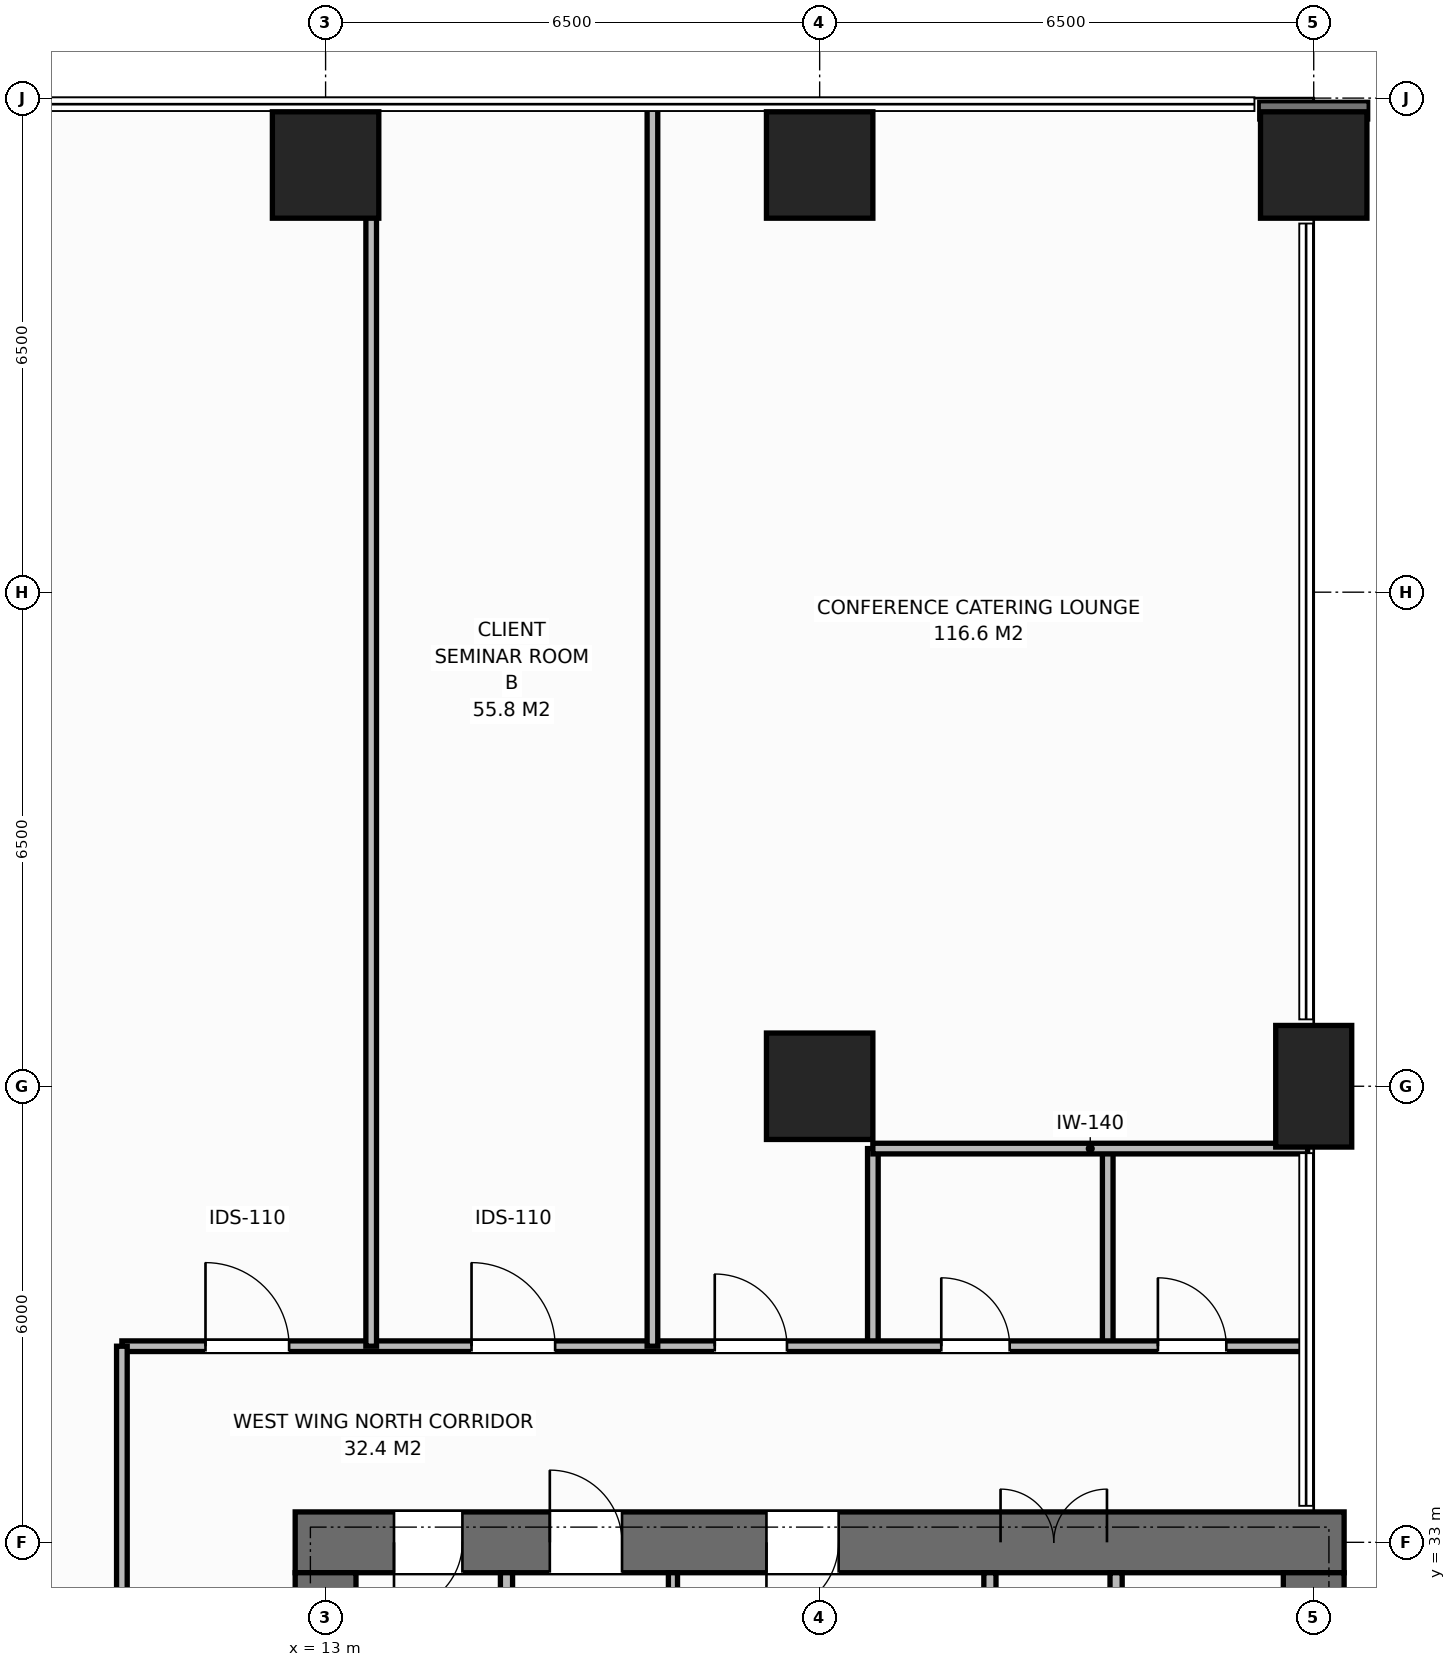
"""IFC4 building model, lengths in metres.
Left out: names, types, materials, properties, quantities, classifications, styles, units other than length and angle.
Written with IfcOpenShell. Run it as: python <this file> out.ifc"""

import sys

from ifc_helpers import new_model, si_unit, direction, frame, frame_2d, origin, origin_2d, place, context, subcontext, project, spatial, rectangle, extrude, element, fill, save


model = new_model("IFC4")
c1 = context("Model", 3, precision=1e-05, world=origin(), true_north=direction((0.0, 1.0)))
c2 = subcontext(c1, "Body", "Model", "MODEL_VIEW")
j1 = project(units=[si_unit("LENGTHUNIT", "METRE"), si_unit("PLANEANGLEUNIT", "RADIAN")], contexts=[c1])
p1 = place(None, origin())
s1 = spatial("IfcSite", under=j1, at=p1, CompositionType="ELEMENT")
p2 = place(p1, origin())
s2 = spatial("IfcBuilding", under=s1, at=p2, CompositionType="ELEMENT")
p3 = place(p2, frame((0.0, 0.0, 6.0)))
s3 = spatial("IfcBuildingStorey", under=s2, at=p3, CompositionType="ELEMENT", Elevation=6.0)
p4 = place(p3, frame((12.6, 33.0, 0.0), z_axis=(0.0, 0.0, 1.0), x_axis=(1.0, 0.0, 0.0)))
e1 = element("IfcWall", 1, at=p4, inside=s3, PredefinedType="SHEAR", context=c2, shape_type="SweptSolid", body=[
    extrude(rectangle(XDim=13.8, YDim=0.8, at=frame_2d((6.9, 0.0))), origin(), (0.0, 0.0, 1.0), 5.5),
])
p5 = place(p4, frame((1.3, 0.0, 0.0)))
e2 = element("IfcOpeningElement", 2, at=p5, cuts=e1, PredefinedType="OPENING", context=c2, shape_type="SweptSolid", body=[
    extrude(rectangle(XDim=0.9, YDim=2.15, at=frame_2d((0.45, 1.075))), frame((0.0, 0.41, 0.0), z_axis=(0.0, -1.0, 0.0), x_axis=(1.0, 0.0, 0.0)), (0.0, 0.0, 1.0), 0.82),
])
p6 = place(p4, frame((3.35, 0.0, 0.0)))
e3 = element("IfcOpeningElement", 3, at=p6, cuts=e1, PredefinedType="OPENING", context=c2, shape_type="SweptSolid", body=[
    extrude(rectangle(XDim=0.95, YDim=2.15, at=frame_2d((0.475, 1.075))), frame((0.0, 0.41, 0.0), z_axis=(0.0, -1.0, 0.0), x_axis=(1.0, 0.0, 0.0)), (0.0, 0.0, 1.0), 0.82),
])
p7 = place(p4, frame((6.2, 0.0, 0.0)))
e4 = element("IfcOpeningElement", 4, at=p7, cuts=e1, PredefinedType="OPENING", context=c2, shape_type="SweptSolid", body=[
    extrude(rectangle(XDim=0.95, YDim=2.15, at=frame_2d((0.475, 1.075))), frame((0.0, 0.41, 0.0), z_axis=(0.0, -1.0, 0.0), x_axis=(1.0, 0.0, 0.0)), (0.0, 0.0, 1.0), 0.82),
])
p8 = place(p4, frame((9.28, 0.0, 0.0)))
e5 = element("IfcOpeningElement", 5, at=p8, cuts=e1, PredefinedType="OPENING", context=c2, shape_type="SweptSolid", body=[
    extrude(rectangle(XDim=1.4, YDim=2.2, at=frame_2d((0.7, 1.1))), frame((0.0, 0.41, 0.0), z_axis=(0.0, -1.0, 0.0), x_axis=(1.0, 0.0, 0.0)), (0.0, 0.0, 1.0), 0.82),
])
p9 = place(p3, frame((13.0, 19.4, 0.0), z_axis=(0.0, 0.0, 1.0), x_axis=(0.0, 1.0, 0.0)))
e6 = element("IfcWall", 6, at=p9, inside=s3, PredefinedType="SHEAR", context=c2, shape_type="SweptSolid", body=[
    extrude(rectangle(XDim=13.2, YDim=0.8, at=frame_2d((6.6, 0.0))), origin(), (0.0, 0.0, 1.0), 5.5),
])
p10 = place(p9, frame((4.65, 0.0, 0.0)))
e7 = element("IfcOpeningElement", 7, at=p10, cuts=e6, PredefinedType="OPENING", context=c2, shape_type="SweptSolid", body=[
    extrude(rectangle(XDim=1.4, YDim=2.2, at=frame_2d((0.7, 1.1))), frame((0.0, 0.41, 0.0), z_axis=(0.0, -1.0, 0.0), x_axis=(1.0, 0.0, 0.0)), (0.0, 0.0, 1.0), 0.82),
])
p11 = place(p3, frame((26.0, 19.4, 0.0), z_axis=(0.0, 0.0, 1.0), x_axis=(0.0, 1.0, 0.0)))
e8 = element("IfcWall", 8, at=p11, inside=s3, PredefinedType="SHEAR", context=c2, shape_type="SweptSolid", body=[
    extrude(rectangle(XDim=13.2, YDim=0.8, at=frame_2d((6.6, 0.0))), origin(), (0.0, 0.0, 1.0), 5.5),
])
p12 = place(p3, frame((19.5, 39.0, 0.0), z_axis=(0.0, 0.0, 1.0), x_axis=(1.0, 0.0, 0.0)))
e9 = element("IfcColumn", 9, at=p12, inside=s3, PredefinedType="COLUMN", context=c2, shape_type="SweptSolid", body=[
    extrude(rectangle(XDim=1.4, YDim=1.4, at=origin_2d()), origin(), (0.0, 0.0, 1.0), 5.5),
])
p13 = place(p3, frame((26.0, 39.0, 0.0), z_axis=(0.0, 0.0, 1.0), x_axis=(1.0, 0.0, 0.0)))
e10 = element("IfcColumn", 10, at=p13, inside=s3, PredefinedType="PILASTER", context=c2, shape_type="SweptSolid", body=[
    extrude(rectangle(XDim=1.0, YDim=1.6, at=origin_2d()), origin(), (0.0, 0.0, 1.0), 5.5),
])
for number, where, z_axis, x_axis in (
    (11, (13.0, 51.12, 0.0), (0.0, 0.0, 1.0), (1.0, 0.0, 0.0)),
    (12, (19.5, 51.12, 0.0), (0.0, 0.0, 1.0), (1.0, 0.0, 0.0)),
    (13, (26.0, 51.12, 0.0), (0.0, 0.0, 1.0), (1.0, 0.0, 0.0)),
):
    element("IfcColumn", number, at=place(p3, frame(where, z_axis=z_axis, x_axis=x_axis)), inside=s3, PredefinedType="COLUMN", context=c2, shape_type="SweptSolid", body=[
        extrude(rectangle(XDim=1.4, YDim=1.4, at=origin_2d()), origin(), (0.0, 0.0, 1.0), 5.5),
    ])
p14 = place(p3, frame((15.38, 26.56, 0.0), z_axis=(0.0, 0.0, 1.0), x_axis=(0.0, 1.0, 0.0)))
e14 = element("IfcWall", 14, at=p14, inside=s3, PredefinedType="STANDARD", context=c2, shape_type="SweptSolid", body=[
    extrude(rectangle(XDim=6.04, YDim=0.16, at=frame_2d((3.02, 0.0))), origin(), (0.0, 0.0, 1.0), 5.22),
])
p15 = place(p3, frame((17.57, 26.56, 0.0), z_axis=(0.0, 0.0, 1.0), x_axis=(0.0, 1.0, 0.0)))
e15 = element("IfcWall", 15, at=p15, inside=s3, PredefinedType="PARTITIONING", context=c2, shape_type="SweptSolid", body=[
    extrude(rectangle(XDim=6.04, YDim=0.12, at=frame_2d((3.02, 0.0))), origin(), (0.0, 0.0, 1.0), 5.22),
])
p16 = place(p3, frame((21.74, 26.56, 0.0), z_axis=(0.0, 0.0, 1.0), x_axis=(0.0, 1.0, 0.0)))
e16 = element("IfcWall", 16, at=p16, inside=s3, PredefinedType="STANDARD", context=c2, shape_type="SweptSolid", body=[
    extrude(rectangle(XDim=6.04, YDim=0.16, at=frame_2d((3.02, 0.0))), origin(), (0.0, 0.0, 1.0), 5.22),
])
p17 = place(p3, frame((23.4, 19.4, 0.0), z_axis=(0.0, 0.0, 1.0), x_axis=(0.0, 1.0, 0.0)))
e17 = element("IfcWall", 17, at=p17, inside=s3, PredefinedType="STANDARD", context=c2, shape_type="SweptSolid", body=[
    extrude(rectangle(XDim=13.2, YDim=0.16, at=frame_2d((6.6, 0.0))), origin(), (0.0, 0.0, 1.0), 5.22),
])
p18 = place(p17, frame((0.55, 0.0, 0.0)))
e18 = element("IfcOpeningElement", 18, at=p18, cuts=e17, PredefinedType="OPENING", context=c2, shape_type="SweptSolid", body=[
    extrude(rectangle(XDim=1.1, YDim=2.2, at=frame_2d((0.55, 1.1))), frame((0.0, 0.09, 0.0), z_axis=(0.0, -1.0, 0.0), x_axis=(1.0, 0.0, 0.0)), (0.0, 0.0, 1.0), 0.18),
])
p19 = place(p17, frame((2.7, 0.0, 0.0)))
e19 = element("IfcOpeningElement", 19, at=p19, cuts=e17, PredefinedType="OPENING", context=c2, shape_type="SweptSolid", body=[
    extrude(rectangle(XDim=1.1, YDim=2.2, at=frame_2d((0.55, 1.1))), frame((0.0, 0.09, 0.0), z_axis=(0.0, -1.0, 0.0), x_axis=(1.0, 0.0, 0.0)), (0.0, 0.0, 1.0), 0.18),
])
for number, where, z_axis, x_axis in (
    (20, (20.2, 35.58, 0.0), (0.0, 0.0, 1.0), (0.0, 1.0, 0.0)),
    (21, (23.29, 35.58, 0.0), (0.0, 0.0, 1.0), (0.0, 1.0, 0.0)),
):
    element("IfcWall", number, at=place(p3, frame(where, z_axis=z_axis, x_axis=x_axis)), inside=s3, PredefinedType="PARTITIONING", context=c2, shape_type="SweptSolid", body=[
        extrude(rectangle(XDim=2.6, YDim=0.14, at=frame_2d((1.3, 0.0))), origin(), (0.0, 0.0, 1.0), 5.22),
    ])
p20 = place(p3, frame((20.2, 38.18, 0.0), z_axis=(0.0, 0.0, 1.0), x_axis=(1.0, 0.0, 0.0)))
e22 = element("IfcWall", 22, at=p20, inside=s3, PredefinedType="PARTITIONING", context=c2, shape_type="SweptSolid", body=[
    extrude(rectangle(XDim=5.72, YDim=0.14, at=frame_2d((2.86, 0.0))), origin(), (0.0, 0.0, 1.0), 5.22),
])
p21 = place(p3, frame((10.32, 35.58, 0.0), z_axis=(0.0, 0.0, 1.0), x_axis=(1.0, 0.0, 0.0)))
e23 = element("IfcWall", 23, at=p21, inside=s3, PredefinedType="PARTITIONING", context=c2, shape_type="SweptSolid", body=[
    extrude(rectangle(XDim=15.6, YDim=0.14, at=frame_2d((7.8, 0.0))), origin(), (0.0, 0.0, 1.0), 5.22),
])
p22 = place(p21, frame((10.78, 0.0, 0.0)))
e24 = element("IfcOpeningElement", 24, at=p22, cuts=e23, PredefinedType="OPENING", context=c2, shape_type="SweptSolid", body=[
    extrude(rectangle(XDim=0.9, YDim=2.15, at=frame_2d((0.45, 1.075))), frame((0.0, 0.08, 0.0), z_axis=(0.0, -1.0, 0.0), x_axis=(1.0, 0.0, 0.0)), (0.0, 0.0, 1.0), 0.16),
])
p23 = place(p21, frame((13.63, 0.0, 0.0)))
e25 = element("IfcOpeningElement", 25, at=p23, cuts=e23, PredefinedType="OPENING", context=c2, shape_type="SweptSolid", body=[
    extrude(rectangle(XDim=0.9, YDim=2.15, at=frame_2d((0.45, 1.075))), frame((0.0, 0.08, 0.0), z_axis=(0.0, -1.0, 0.0), x_axis=(1.0, 0.0, 0.0)), (0.0, 0.0, 1.0), 0.16),
])
p24 = place(p21, frame((1.1, 0.0, 0.0)))
e26 = element("IfcOpeningElement", 26, at=p24, cuts=e23, PredefinedType="OPENING", context=c2, shape_type="SweptSolid", body=[
    extrude(rectangle(XDim=1.1, YDim=2.15, at=frame_2d((0.55, 1.075))), frame((0.0, 0.08, 0.0), z_axis=(0.0, -1.0, 0.0), x_axis=(1.0, 0.0, 0.0)), (0.0, 0.0, 1.0), 0.16),
])
p25 = place(p21, frame((4.6, 0.0, 0.0)))
e27 = element("IfcOpeningElement", 27, at=p25, cuts=e23, PredefinedType="OPENING", context=c2, shape_type="SweptSolid", body=[
    extrude(rectangle(XDim=1.1, YDim=2.15, at=frame_2d((0.55, 1.075))), frame((0.0, 0.08, 0.0), z_axis=(0.0, -1.0, 0.0), x_axis=(1.0, 0.0, 0.0)), (0.0, 0.0, 1.0), 0.16),
])
p26 = place(p21, frame((7.8, 0.0, 0.0)))
e28 = element("IfcOpeningElement", 28, at=p26, cuts=e23, PredefinedType="OPENING", context=c2, shape_type="SweptSolid", body=[
    extrude(rectangle(XDim=0.95, YDim=2.15, at=frame_2d((0.475, 1.075))), frame((0.0, 0.08, 0.0), z_axis=(0.0, -1.0, 0.0), x_axis=(1.0, 0.0, 0.0)), (0.0, 0.0, 1.0), 0.16),
])
for number, where, z_axis, x_axis in (
    (29, (13.6, 35.58, 0.0), (0.0, 0.0, 1.0), (0.0, 1.0, 0.0)),
    (30, (17.3, 35.58, 0.0), (0.0, 0.0, 1.0), (0.0, 1.0, 0.0)),
):
    element("IfcWall", number, at=place(p3, frame(where, z_axis=z_axis, x_axis=x_axis)), inside=s3, PredefinedType="PARTITIONING", context=c2, shape_type="SweptSolid", body=[
        extrude(rectangle(XDim=16.36, YDim=0.14, at=frame_2d((8.18, 0.0))), origin(), (0.0, 0.0, 1.0), 5.22),
    ])
p27 = place(p3, frame((10.32, 18.6, 0.0), z_axis=(0.0, 0.0, 1.0), x_axis=(0.0, 1.0, 0.0)))
e31 = element("IfcWall", 31, at=p27, inside=s3, PredefinedType="PARTITIONING", context=c2, shape_type="SweptSolid", body=[
    extrude(rectangle(XDim=16.98, YDim=0.14, at=frame_2d((8.49, 0.0))), origin(), (0.0, 0.0, 1.0), 5.22),
])
p28 = place(p27, frame((4.0, 0.0, 0.0)))
e32 = element("IfcOpeningElement", 32, at=p28, cuts=e31, PredefinedType="OPENING", context=c2, shape_type="SweptSolid", body=[
    extrude(rectangle(XDim=1.1, YDim=2.15, at=frame_2d((0.55, 1.075))), frame((0.0, 0.08, 0.0), z_axis=(0.0, -1.0, 0.0), x_axis=(1.0, 0.0, 0.0)), (0.0, 0.0, 1.0), 0.16),
])
p29 = place(p5, origin())
e33 = element("IfcDoor", 33, at=p29, inside=s3, OperationType="SINGLE_SWING_RIGHT", PredefinedType="DOOR", context=c2, shape_type="SweptSolid", body=[
    extrude(rectangle(XDim=0.9, YDim=2.15, at=frame_2d((0.45, 1.075))), frame((0.0, -0.075, 0.0), z_axis=(0.0, -1.0, 0.0), x_axis=(1.0, 0.0, 0.0)), (0.0, 0.0, 1.0), 0.05),
])
fill(e2, e33)
p30 = place(p6, origin())
e34 = element("IfcDoor", 34, at=p30, inside=s3, OperationType="SINGLE_SWING_LEFT", PredefinedType="DOOR", context=c2, shape_type="SweptSolid", body=[
    extrude(rectangle(XDim=0.95, YDim=2.15, at=frame_2d((0.475, 1.075))), frame((0.0, -0.075, 0.0), z_axis=(0.0, -1.0, 0.0), x_axis=(1.0, 0.0, 0.0)), (0.0, 0.0, 1.0), 0.05),
])
fill(e3, e34)
p31 = place(p7, origin())
e35 = element("IfcDoor", 35, at=p31, inside=s3, OperationType="SINGLE_SWING_RIGHT", PredefinedType="DOOR", context=c2, shape_type="SweptSolid", body=[
    extrude(rectangle(XDim=0.95, YDim=2.15, at=frame_2d((0.475, 1.075))), frame((0.0, -0.075, 0.0), z_axis=(0.0, -1.0, 0.0), x_axis=(1.0, 0.0, 0.0)), (0.0, 0.0, 1.0), 0.05),
])
fill(e4, e35)
p32 = place(p8, origin())
e36 = element("IfcDoor", 36, at=p32, inside=s3, OperationType="DOUBLE_DOOR_SINGLE_SWING", PredefinedType="DOOR", context=c2, shape_type="SweptSolid", body=[
    extrude(rectangle(XDim=1.4, YDim=2.2, at=frame_2d((0.7, 1.1))), frame((0.0, -0.075, 0.0), z_axis=(0.0, -1.0, 0.0), x_axis=(1.0, 0.0, 0.0)), (0.0, 0.0, 1.0), 0.05),
])
fill(e5, e36)
p33 = place(p22, origin())
e37 = element("IfcDoor", 37, at=p33, inside=s3, OperationType="SINGLE_SWING_LEFT", PredefinedType="DOOR", context=c2, shape_type="SweptSolid", body=[
    extrude(rectangle(XDim=0.9, YDim=2.15, at=frame_2d((0.45, 1.075))), frame((0.0, 0.025, 0.0), z_axis=(0.0, -1.0, 0.0), x_axis=(1.0, 0.0, 0.0)), (0.0, 0.0, 1.0), 0.05),
])
fill(e24, e37)
p34 = place(p23, origin())
e38 = element("IfcDoor", 38, at=p34, inside=s3, OperationType="SINGLE_SWING_LEFT", PredefinedType="DOOR", context=c2, shape_type="SweptSolid", body=[
    extrude(rectangle(XDim=0.9, YDim=2.15, at=frame_2d((0.45, 1.075))), frame((0.0, 0.025, 0.0), z_axis=(0.0, -1.0, 0.0), x_axis=(1.0, 0.0, 0.0)), (0.0, 0.0, 1.0), 0.05),
])
fill(e25, e38)
p35 = place(p24, origin())
e39 = element("IfcDoor", 39, at=p35, inside=s3, OperationType="SINGLE_SWING_LEFT", PredefinedType="DOOR", context=c2, shape_type="SweptSolid", body=[
    extrude(rectangle(XDim=1.1, YDim=2.15, at=frame_2d((0.55, 1.075))), frame((0.0, 0.025, 0.0), z_axis=(0.0, -1.0, 0.0), x_axis=(1.0, 0.0, 0.0)), (0.0, 0.0, 1.0), 0.05),
])
fill(e26, e39)
p36 = place(p25, origin())
e40 = element("IfcDoor", 40, at=p36, inside=s3, OperationType="SINGLE_SWING_LEFT", PredefinedType="DOOR", context=c2, shape_type="SweptSolid", body=[
    extrude(rectangle(XDim=1.1, YDim=2.15, at=frame_2d((0.55, 1.075))), frame((0.0, 0.025, 0.0), z_axis=(0.0, -1.0, 0.0), x_axis=(1.0, 0.0, 0.0)), (0.0, 0.0, 1.0), 0.05),
])
fill(e27, e40)
p37 = place(p26, origin())
e41 = element("IfcDoor", 41, at=p37, inside=s3, OperationType="SINGLE_SWING_LEFT", PredefinedType="DOOR", context=c2, shape_type="SweptSolid", body=[
    extrude(rectangle(XDim=0.95, YDim=2.15, at=frame_2d((0.475, 1.075))), frame((0.0, 0.025, 0.0), z_axis=(0.0, -1.0, 0.0), x_axis=(1.0, 0.0, 0.0)), (0.0, 0.0, 1.0), 0.05),
])
fill(e28, e41)
save(model, sys.argv[1])
